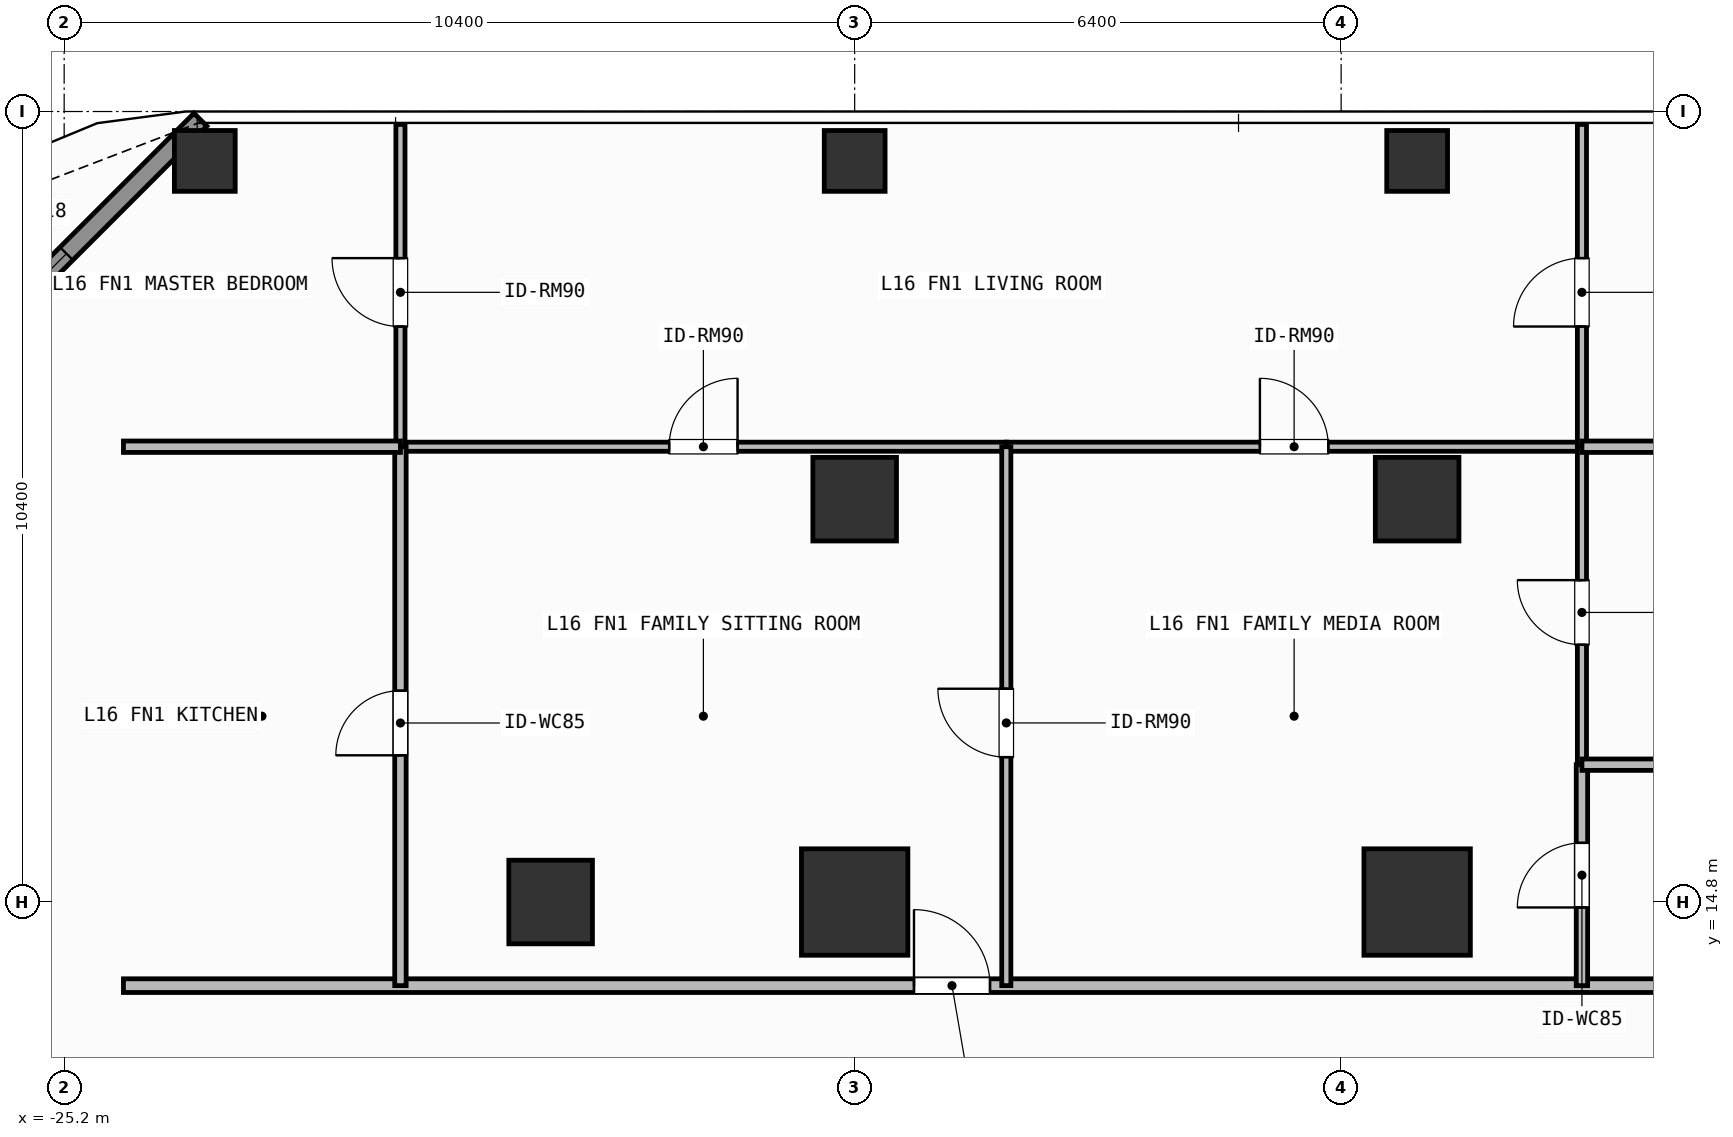
"""IFC4 building model, lengths in metres.
Left out: names, types, materials, properties, quantities, classifications, styles, units other than length and angle.
Written with IfcOpenShell. Run it as: python <this file> out.ifc"""

import sys

from ifc_helpers import new_model, si_unit, direction, frame, frame_2d, origin, origin_2d, place, context, subcontext, project, spatial, rectangle, hollow_rectangle, extrude, element, fill, save


model = new_model("IFC4")
c1 = context("Model", 3, precision=1e-05, world=origin(), true_north=direction((0.0, 1.0)))
c2 = subcontext(c1, "Body", "Model", "MODEL_VIEW")
j1 = project(units=[si_unit("LENGTHUNIT", "METRE"), si_unit("PLANEANGLEUNIT", "RADIAN")], contexts=[c1])
p1 = place(None, origin())
s1 = spatial("IfcSite", under=j1, at=p1, CompositionType="ELEMENT")
p2 = place(p1, origin())
s2 = spatial("IfcBuilding", under=s1, at=p2, CompositionType="ELEMENT")
p3 = place(p2, frame((0.0, 0.0, 61.8)))
s3 = spatial("IfcBuildingStorey", under=s2, at=p3, CompositionType="ELEMENT", Elevation=61.8)
for number, where, z_axis, x_axis in (
    (1, (-14.8, 14.8, 0.0), (0.0, 0.0, 1.0), (1.0, 0.0, 0.0)),
    (2, (-7.4, 14.8, 0.0), (0.0, 0.0, 1.0), (1.0, 0.0, 0.0)),
):
    element("IfcColumn", number, at=place(p3, frame(where, z_axis=z_axis, x_axis=x_axis)), inside=s3, PredefinedType="COLUMN", context=c2, shape_type="SweptSolid", body=[
        extrude(rectangle(XDim=1.4, YDim=1.4, at=origin_2d()), origin(), (0.0, 0.0, 1.0), 3.9),
    ])
for number, where, z_axis, x_axis in (
    (3, (-18.8, 14.8, 0.0), (0.0, 0.0, 1.0), (1.0, 0.0, 0.0)),
    (4, (-14.8, 20.1, 0.0), (0.0, 0.0, 1.0), (1.0, 0.0, 0.0)),
    (5, (-7.4, 20.1, 0.0), (0.0, 0.0, 1.0), (1.0, 0.0, 0.0)),
):
    element("IfcColumn", number, at=place(p3, frame(where, z_axis=z_axis, x_axis=x_axis)), inside=s3, PredefinedType="COLUMN", context=c2, shape_type="SweptSolid", body=[
        extrude(rectangle(XDim=1.1, YDim=1.1, at=origin_2d()), origin(), (0.0, 0.0, 1.0), 3.9),
    ])
for number, where, z_axis, x_axis in (
    (6, (-23.35, 24.55, 0.0), (0.0, 0.0, 1.0), (1.0, 0.0, 0.0)),
    (7, (-14.8, 24.55, 0.0), (0.0, 0.0, 1.0), (1.0, 0.0, 0.0)),
    (8, (-7.4, 24.55, 0.0), (0.0, 0.0, 1.0), (1.0, 0.0, 0.0)),
):
    element("IfcColumn", number, at=place(p3, frame(where, z_axis=z_axis, x_axis=x_axis)), inside=s3, PredefinedType="COLUMN", context=c2, shape_type="SweptSolid", body=[
        extrude(hollow_rectangle(XDim=0.8, YDim=0.8, WallThickness=0.036, at=origin_2d()), origin(), (0.0, 0.0, 1.0), 3.9),
    ])
p4 = place(p3, frame((-27.992, 20.508, 0.0), z_axis=(0.0, 0.0, 1.0), x_axis=(0.707106781187, 0.707106781187, 0.0)))
e9 = element("IfcWall", 9, at=p4, inside=s3, PredefinedType="SOLIDWALL", context=c2, shape_type="SweptSolid", body=[
    extrude(rectangle(XDim=6.484, YDim=0.24, at=frame_2d((3.242, 0.0))), origin(), (0.0, 0.0, 1.0), 3.68),
])
p5 = place(p4, frame((2.492, 0.0, 0.8)))
e10 = element("IfcOpeningElement", 10, at=p5, cuts=e9, PredefinedType="OPENING", context=c2, shape_type="SweptSolid", body=[
    extrude(rectangle(XDim=1.5, YDim=1.85, at=frame_2d((0.75, 0.925))), frame((0.0, 0.13, 0.0), z_axis=(0.0, -1.0, 0.0), x_axis=(1.0, 0.0, 0.0)), (0.0, 0.0, 1.0), 0.26),
])
p6 = place(p3, frame((-24.42, 13.7, 0.0), z_axis=(0.0, 0.0, 1.0), x_axis=(1.0, 0.0, 0.0)))
e11 = element("IfcWall", 11, at=p6, inside=s3, PredefinedType="PARTITIONING", context=c2, shape_type="SweptSolid", body=[
    extrude(rectangle(XDim=25.394, YDim=0.18, at=frame_2d((12.697, 0.0))), origin(), (0.0, 0.0, 1.0), 3.68),
])
p7 = place(p6, frame((10.4, 0.0, 0.0)))
e12 = element("IfcOpeningElement", 12, at=p7, cuts=e11, PredefinedType="OPENING", context=c2, shape_type="SweptSolid", body=[
    extrude(rectangle(XDim=1.0, YDim=2.2, at=frame_2d((0.5, 1.1))), frame((0.0, 0.1, 0.0), z_axis=(0.0, -1.0, 0.0), x_axis=(1.0, 0.0, 0.0)), (0.0, 0.0, 1.0), 0.2),
])
p8 = place(p3, frame((-20.776, 20.79, 0.0), z_axis=(0.0, 0.0, 1.0), x_axis=(1.0, 0.0, 0.0)))
e13 = element("IfcWall", 13, at=p8, inside=s3, PredefinedType="PARTITIONING", context=c2, shape_type="SweptSolid", body=[
    extrude(rectangle(XDim=7.971, YDim=0.12, at=frame_2d((3.985, 0.0))), origin(), (0.0, 0.0, 1.0), 3.68),
])
p9 = place(p8, frame((3.535, 0.0, 0.0)))
e14 = element("IfcOpeningElement", 14, at=p9, cuts=e13, PredefinedType="OPENING", context=c2, shape_type="SweptSolid", body=[
    extrude(rectangle(XDim=0.9, YDim=2.1, at=frame_2d((0.45, 1.05))), frame((0.0, 0.07, 0.0), z_axis=(0.0, -1.0, 0.0), x_axis=(1.0, 0.0, 0.0)), (0.0, 0.0, 1.0), 0.14),
])
p10 = place(p3, frame((-12.805, 20.79, 0.0), z_axis=(0.0, 0.0, 1.0), x_axis=(1.0, 0.0, 0.0)))
e15 = element("IfcWall", 15, at=p10, inside=s3, PredefinedType="PARTITIONING", context=c2, shape_type="SweptSolid", body=[
    extrude(rectangle(XDim=7.573, YDim=0.12, at=frame_2d((3.787, 0.0))), origin(), (0.0, 0.0, 1.0), 3.68),
])
p11 = place(p10, frame((3.336, 0.0, 0.0)))
e16 = element("IfcOpeningElement", 16, at=p11, cuts=e15, PredefinedType="OPENING", context=c2, shape_type="SweptSolid", body=[
    extrude(rectangle(XDim=0.9, YDim=2.1, at=frame_2d((0.45, 1.05))), frame((0.0, 0.07, 0.0), z_axis=(0.0, -1.0, 0.0), x_axis=(1.0, 0.0, 0.0)), (0.0, 0.0, 1.0), 0.14),
])
p12 = place(p3, frame((-12.805, 13.7, 0.0), z_axis=(0.0, 0.0, 1.0), x_axis=(0.0, 1.0, 0.0)))
e17 = element("IfcWall", 17, at=p12, inside=s3, PredefinedType="PARTITIONING", context=c2, shape_type="SweptSolid", body=[
    extrude(rectangle(XDim=7.09, YDim=0.12, at=frame_2d((3.545, 0.0))), origin(), (0.0, 0.0, 1.0), 3.68),
])
p13 = place(p12, frame((3.006, 0.0, 0.0)))
e18 = element("IfcOpeningElement", 18, at=p13, cuts=e17, PredefinedType="OPENING", context=c2, shape_type="SweptSolid", body=[
    extrude(rectangle(XDim=0.9, YDim=2.1, at=frame_2d((0.45, 1.05))), frame((0.0, 0.07, 0.0), z_axis=(0.0, -1.0, 0.0), x_axis=(1.0, 0.0, 0.0)), (0.0, 0.0, 1.0), 0.14),
])
p14 = place(p3, frame((-20.776, 13.7, 0.0), z_axis=(0.0, 0.0, 1.0), x_axis=(0.0, 1.0, 0.0)))
e19 = element("IfcWall", 19, at=p14, inside=s3, PredefinedType="PARTITIONING", context=c2, shape_type="SweptSolid", body=[
    extrude(rectangle(XDim=7.09, YDim=0.15, at=frame_2d((3.545, 0.0))), origin(), (0.0, 0.0, 1.0), 3.68),
])
p15 = place(p14, frame((3.03, 0.0, 0.0)))
e20 = element("IfcOpeningElement", 20, at=p15, cuts=e19, PredefinedType="OPENING", context=c2, shape_type="SweptSolid", body=[
    extrude(rectangle(XDim=0.85, YDim=2.1, at=frame_2d((0.425, 1.05))), frame((0.0, 0.085, 0.0), z_axis=(0.0, -1.0, 0.0), x_axis=(1.0, 0.0, 0.0)), (0.0, 0.0, 1.0), 0.17),
])
p16 = place(p3, frame((-20.776, 20.79, 0.0), z_axis=(0.0, 0.0, 1.0), x_axis=(0.0, 1.0, 0.0)))
e21 = element("IfcWall", 21, at=p16, inside=s3, PredefinedType="PARTITIONING", context=c2, shape_type="SweptSolid", body=[
    extrude(rectangle(XDim=4.24, YDim=0.12, at=frame_2d((2.12, 0.0))), origin(), (0.0, 0.0, 1.0), 3.68),
])
p17 = place(p16, frame((1.581, 0.0, 0.0)))
e22 = element("IfcOpeningElement", 22, at=p17, cuts=e21, PredefinedType="OPENING", context=c2, shape_type="SweptSolid", body=[
    extrude(rectangle(XDim=0.9, YDim=2.1, at=frame_2d((0.45, 1.05))), frame((0.0, 0.07, 0.0), z_axis=(0.0, -1.0, 0.0), x_axis=(1.0, 0.0, 0.0)), (0.0, 0.0, 1.0), 0.14),
])
p18 = place(p3, frame((-5.232, 13.7, 0.0), z_axis=(0.0, 0.0, 1.0), x_axis=(0.0, 1.0, 0.0)))
e23 = element("IfcWall", 23, at=p18, inside=s3, PredefinedType="PARTITIONING", context=c2, shape_type="SweptSolid", body=[
    extrude(rectangle(XDim=2.907, YDim=0.15, at=frame_2d((1.454, 0.0))), origin(), (0.0, 0.0, 1.0), 3.68),
])
p19 = place(p18, frame((1.029, 0.0, 0.0)))
e24 = element("IfcOpeningElement", 24, at=p19, cuts=e23, PredefinedType="OPENING", context=c2, shape_type="SweptSolid", body=[
    extrude(rectangle(XDim=0.85, YDim=2.1, at=frame_2d((0.425, 1.05))), frame((0.0, 0.085, 0.0), z_axis=(0.0, -1.0, 0.0), x_axis=(1.0, 0.0, 0.0)), (0.0, 0.0, 1.0), 0.17),
])
p20 = place(p3, frame((-5.232, 16.607, 0.0), z_axis=(0.0, 0.0, 1.0), x_axis=(0.0, 1.0, 0.0)))
e25 = element("IfcWall", 25, at=p20, inside=s3, PredefinedType="PARTITIONING", context=c2, shape_type="SweptSolid", body=[
    extrude(rectangle(XDim=4.183, YDim=0.12, at=frame_2d((2.092, 0.0))), origin(), (0.0, 0.0, 1.0), 3.68),
])
p21 = place(p20, frame((1.578, 0.0, 0.0)))
e26 = element("IfcOpeningElement", 26, at=p21, cuts=e25, PredefinedType="OPENING", context=c2, shape_type="SweptSolid", body=[
    extrude(rectangle(XDim=0.85, YDim=2.1, at=frame_2d((0.425, 1.05))), frame((0.0, 0.07, 0.0), z_axis=(0.0, -1.0, 0.0), x_axis=(1.0, 0.0, 0.0)), (0.0, 0.0, 1.0), 0.14),
])
p22 = place(p3, frame((-5.232, 20.79, 0.0), z_axis=(0.0, 0.0, 1.0), x_axis=(0.0, 1.0, 0.0)))
e27 = element("IfcWall", 27, at=p22, inside=s3, PredefinedType="PARTITIONING", context=c2, shape_type="SweptSolid", body=[
    extrude(rectangle(XDim=4.24, YDim=0.12, at=frame_2d((2.12, 0.0))), origin(), (0.0, 0.0, 1.0), 3.68),
])
p23 = place(p22, frame((1.581, 0.0, 0.0)))
e28 = element("IfcOpeningElement", 28, at=p23, cuts=e27, PredefinedType="OPENING", context=c2, shape_type="SweptSolid", body=[
    extrude(rectangle(XDim=0.9, YDim=2.1, at=frame_2d((0.45, 1.05))), frame((0.0, 0.07, 0.0), z_axis=(0.0, -1.0, 0.0), x_axis=(1.0, 0.0, 0.0)), (0.0, 0.0, 1.0), 0.14),
])
p24 = place(p3, frame((-24.42, 20.79, 0.0), z_axis=(0.0, 0.0, 1.0), x_axis=(1.0, 0.0, 0.0)))
e29 = element("IfcWall", 29, at=p24, inside=s3, PredefinedType="PARTITIONING", context=c2, shape_type="SweptSolid", body=[
    extrude(rectangle(XDim=3.644, YDim=0.15, at=frame_2d((1.822, 0.0))), origin(), (0.0, 0.0, 1.0), 3.68),
])
for number, where, z_axis, x_axis in (
    (30, (-5.232, 16.607, 0.0), (0.0, 0.0, 1.0), (1.0, 0.0, 0.0)),
    (31, (-5.232, 20.79, 0.0), (0.0, 0.0, 1.0), (1.0, 0.0, 0.0)),
):
    element("IfcWall", number, at=place(p3, frame(where, z_axis=z_axis, x_axis=x_axis)), inside=s3, PredefinedType="PARTITIONING", context=c2, shape_type="SweptSolid", body=[
        extrude(rectangle(XDim=6.206, YDim=0.15, at=frame_2d((3.103, 0.0))), origin(), (0.0, 0.0, 1.0), 3.68),
    ])
p25 = place(p5, origin())
e32 = element("IfcWindow", 32, at=p25, inside=s3, PartitioningType="SINGLE_PANEL", PredefinedType="WINDOW", context=c2, shape_type="SweptSolid", body=[
    extrude(rectangle(XDim=1.5, YDim=1.85, at=frame_2d((0.75, 0.925))), frame((0.0, 0.03, 0.0), z_axis=(0.0, -1.0, 0.0), x_axis=(1.0, 0.0, 0.0)), (0.0, 0.0, 1.0), 0.06),
])
fill(e10, e32)
p26 = place(p7, origin())
e33 = element("IfcDoor", 33, at=p26, inside=s3, OperationType="SINGLE_SWING_LEFT", PredefinedType="DOOR", context=c2, shape_type="SweptSolid", body=[
    extrude(rectangle(XDim=1.0, YDim=2.2, at=frame_2d((0.5, 1.1))), frame((0.0, 0.025, 0.0), z_axis=(0.0, -1.0, 0.0), x_axis=(1.0, 0.0, 0.0)), (0.0, 0.0, 1.0), 0.05),
])
fill(e12, e33)
p27 = place(p9, origin())
e34 = element("IfcDoor", 34, at=p27, inside=s3, OperationType="SINGLE_SWING_RIGHT", PredefinedType="DOOR", context=c2, shape_type="SweptSolid", body=[
    extrude(rectangle(XDim=0.9, YDim=2.1, at=frame_2d((0.45, 1.05))), frame((0.0, 0.025, 0.0), z_axis=(0.0, -1.0, 0.0), x_axis=(1.0, 0.0, 0.0)), (0.0, 0.0, 1.0), 0.05),
])
fill(e14, e34)
p28 = place(p11, origin())
e35 = element("IfcDoor", 35, at=p28, inside=s3, OperationType="SINGLE_SWING_LEFT", PredefinedType="DOOR", context=c2, shape_type="SweptSolid", body=[
    extrude(rectangle(XDim=0.9, YDim=2.1, at=frame_2d((0.45, 1.05))), frame((0.0, 0.025, 0.0), z_axis=(0.0, -1.0, 0.0), x_axis=(1.0, 0.0, 0.0)), (0.0, 0.0, 1.0), 0.05),
])
fill(e16, e35)
p29 = place(p13, origin())
e36 = element("IfcDoor", 36, at=p29, inside=s3, OperationType="SINGLE_SWING_RIGHT", PredefinedType="DOOR", context=c2, shape_type="SweptSolid", body=[
    extrude(rectangle(XDim=0.9, YDim=2.1, at=frame_2d((0.45, 1.05))), frame((0.0, 0.025, 0.0), z_axis=(0.0, -1.0, 0.0), x_axis=(1.0, 0.0, 0.0)), (0.0, 0.0, 1.0), 0.05),
])
fill(e18, e36)
p30 = place(p15, origin())
e37 = element("IfcDoor", 37, at=p30, inside=s3, OperationType="SINGLE_SWING_LEFT", PredefinedType="DOOR", context=c2, shape_type="SweptSolid", body=[
    extrude(rectangle(XDim=0.85, YDim=2.1, at=frame_2d((0.425, 1.05))), frame((0.0, 0.025, 0.0), z_axis=(0.0, -1.0, 0.0), x_axis=(1.0, 0.0, 0.0)), (0.0, 0.0, 1.0), 0.05),
])
fill(e20, e37)
p31 = place(p17, origin())
e38 = element("IfcDoor", 38, at=p31, inside=s3, OperationType="SINGLE_SWING_RIGHT", PredefinedType="DOOR", context=c2, shape_type="SweptSolid", body=[
    extrude(rectangle(XDim=0.9, YDim=2.1, at=frame_2d((0.45, 1.05))), frame((0.0, 0.025, 0.0), z_axis=(0.0, -1.0, 0.0), x_axis=(1.0, 0.0, 0.0)), (0.0, 0.0, 1.0), 0.05),
])
fill(e22, e38)
p32 = place(p19, origin())
e39 = element("IfcDoor", 39, at=p32, inside=s3, OperationType="SINGLE_SWING_LEFT", PredefinedType="DOOR", context=c2, shape_type="SweptSolid", body=[
    extrude(rectangle(XDim=0.85, YDim=2.1, at=frame_2d((0.425, 1.05))), frame((0.0, 0.025, 0.0), z_axis=(0.0, -1.0, 0.0), x_axis=(1.0, 0.0, 0.0)), (0.0, 0.0, 1.0), 0.05),
])
fill(e24, e39)
p33 = place(p21, origin())
e40 = element("IfcDoor", 40, at=p33, inside=s3, OperationType="SINGLE_SWING_RIGHT", PredefinedType="DOOR", context=c2, shape_type="SweptSolid", body=[
    extrude(rectangle(XDim=0.85, YDim=2.1, at=frame_2d((0.425, 1.05))), frame((0.0, 0.025, 0.0), z_axis=(0.0, -1.0, 0.0), x_axis=(1.0, 0.0, 0.0)), (0.0, 0.0, 1.0), 0.05),
])
fill(e26, e40)
p34 = place(p23, origin())
e41 = element("IfcDoor", 41, at=p34, inside=s3, OperationType="SINGLE_SWING_LEFT", PredefinedType="DOOR", context=c2, shape_type="SweptSolid", body=[
    extrude(rectangle(XDim=0.9, YDim=2.1, at=frame_2d((0.45, 1.05))), frame((0.0, 0.025, 0.0), z_axis=(0.0, -1.0, 0.0), x_axis=(1.0, 0.0, 0.0)), (0.0, 0.0, 1.0), 0.05),
])
fill(e28, e41)
save(model, sys.argv[1])
